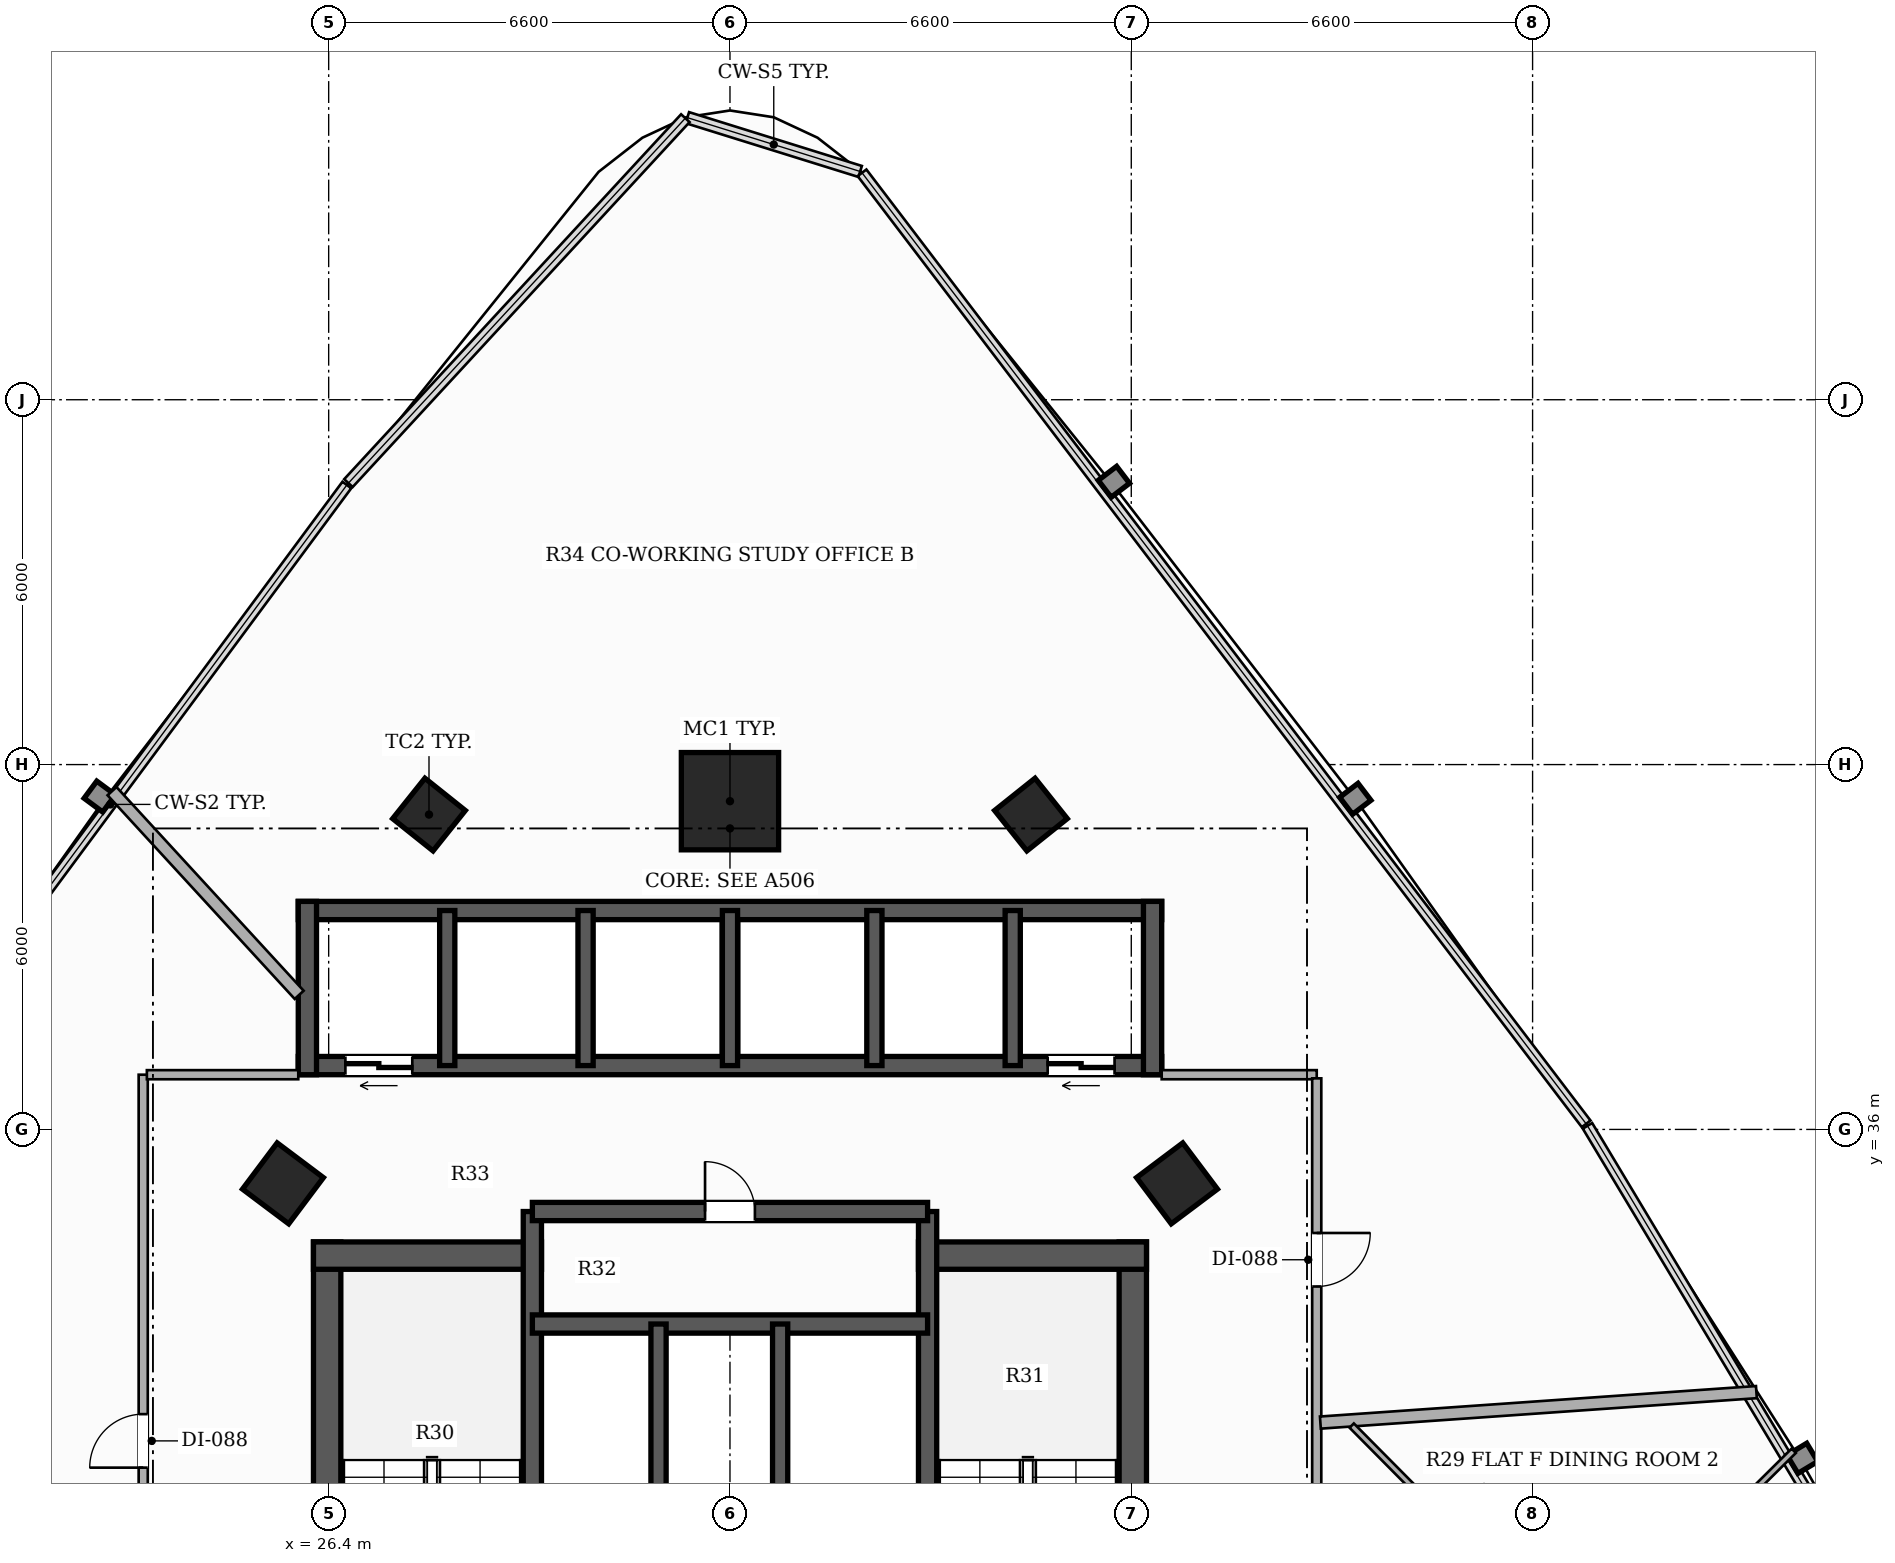
"""IFC4 building model, lengths in metres.
Left out: names, types, materials, properties, quantities, classifications, styles, units other than length and angle.
Written with IfcOpenShell. Run it as: python <this file> out.ifc"""

import sys

from ifc_helpers import new_model, si_unit, direction, frame, frame_2d, origin, origin_2d, place, context, subcontext, project, spatial, rectangle, hollow_rectangle, extrude, element, fill, save


model = new_model("IFC4")
c1 = context("Model", 3, precision=1e-05, world=origin(), true_north=direction((0.0, 1.0)))
c2 = subcontext(c1, "Body", "Model", "MODEL_VIEW")
j1 = project(units=[si_unit("LENGTHUNIT", "METRE"), si_unit("PLANEANGLEUNIT", "RADIAN")], contexts=[c1])
p1 = place(None, origin())
s1 = spatial("IfcSite", under=j1, at=p1, CompositionType="ELEMENT")
p2 = place(p1, origin())
s2 = spatial("IfcBuilding", under=s1, at=p2, CompositionType="ELEMENT")
p3 = place(p2, frame((0.0, 0.0, 26.9)))
s3 = spatial("IfcBuildingStorey", under=s2, at=p3, CompositionType="ELEMENT", Elevation=26.9)
p4 = place(p3, frame((26.375, 26.45, 0.0), z_axis=(0.0, 0.0, 1.0), x_axis=(0.0, 1.0, 0.0)))
e1 = element("IfcWall", 1, at=p4, inside=s3, PredefinedType="SHEAR", context=c2, shape_type="SweptSolid", body=[
    extrude(rectangle(XDim=7.7, YDim=0.45, at=frame_2d((3.85, 0.0))), origin(), (0.0, 0.0, 1.0), 3.3),
])
p5 = place(p3, frame((26.15, 33.925, 0.0), z_axis=(0.0, 0.0, 1.0), x_axis=(1.0, 0.0, 0.0)))
e2 = element("IfcWall", 2, at=p5, inside=s3, PredefinedType="SHEAR", context=c2, shape_type="SweptSolid", body=[
    extrude(rectangle(XDim=3.75, YDim=0.45, at=frame_2d((1.875, 0.0))), origin(), (0.0, 0.0, 1.0), 3.3),
])
p6 = place(p3, frame((39.625, 26.45, 0.0), z_axis=(0.0, 0.0, 1.0), x_axis=(0.0, 1.0, 0.0)))
e3 = element("IfcWall", 3, at=p6, inside=s3, PredefinedType="SHEAR", context=c2, shape_type="SweptSolid", body=[
    extrude(rectangle(XDim=7.7, YDim=0.45, at=frame_2d((3.85, 0.0))), origin(), (0.0, 0.0, 1.0), 3.3),
])
p7 = place(p3, frame((36.1, 33.925, 0.0), z_axis=(0.0, 0.0, 1.0), x_axis=(1.0, 0.0, 0.0)))
e4 = element("IfcWall", 4, at=p7, inside=s3, PredefinedType="SHEAR", context=c2, shape_type="SweptSolid", body=[
    extrude(rectangle(XDim=3.75, YDim=0.45, at=frame_2d((1.875, 0.0))), origin(), (0.0, 0.0, 1.0), 3.3),
])
p8 = place(p3, frame((29.75, 26.45, 0.0), z_axis=(0.0, 0.0, 1.0), x_axis=(0.0, 1.0, 0.0)))
e5 = element("IfcWall", 5, at=p8, inside=s3, PredefinedType="SHEAR", context=c2, shape_type="SweptSolid", body=[
    extrude(rectangle(XDim=8.2, YDim=0.3, at=frame_2d((4.1, 0.0))), origin(), (0.0, 0.0, 1.0), 3.3),
])
p9 = place(p8, frame((0.6, 0.0, 0.0)))
e6 = element("IfcOpeningElement", 6, at=p9, cuts=e5, PredefinedType="OPENING", context=c2, shape_type="SweptSolid", body=[
    extrude(rectangle(XDim=1.05, YDim=2.15, at=frame_2d((0.525, 1.075))), frame((0.0, 0.16, 0.0), z_axis=(0.0, -1.0, 0.0), x_axis=(1.0, 0.0, 0.0)), (0.0, 0.0, 1.0), 0.32),
])
p10 = place(p3, frame((36.25, 26.45, 0.0), z_axis=(0.0, 0.0, 1.0), x_axis=(0.0, 1.0, 0.0)))
e7 = element("IfcWall", 7, at=p10, inside=s3, PredefinedType="SHEAR", context=c2, shape_type="SweptSolid", body=[
    extrude(rectangle(XDim=8.2, YDim=0.3, at=frame_2d((4.1, 0.0))), origin(), (0.0, 0.0, 1.0), 3.3),
])
p11 = place(p10, frame((0.6, 0.0, 0.0)))
e8 = element("IfcOpeningElement", 8, at=p11, cuts=e7, PredefinedType="OPENING", context=c2, shape_type="SweptSolid", body=[
    extrude(rectangle(XDim=1.05, YDim=2.15, at=frame_2d((0.525, 1.075))), frame((0.0, 0.16, 0.0), z_axis=(0.0, -1.0, 0.0), x_axis=(1.0, 0.0, 0.0)), (0.0, 0.0, 1.0), 0.32),
])
p12 = place(p3, frame((29.75, 32.8, 0.0), z_axis=(0.0, 0.0, 1.0), x_axis=(1.0, 0.0, 0.0)))
e9 = element("IfcWall", 9, at=p12, inside=s3, PredefinedType="SHEAR", context=c2, shape_type="SweptSolid", body=[
    extrude(rectangle(XDim=6.5, YDim=0.3, at=frame_2d((3.25, 0.0))), origin(), (0.0, 0.0, 1.0), 3.3),
])
for number, where, z_axis, x_axis in (
    (10, (31.825, 29.9, 0.0), (0.0, 0.0, 1.0), (0.0, 1.0, 0.0)),
    (11, (33.825, 29.9, 0.0), (0.0, 0.0, 1.0), (0.0, 1.0, 0.0)),
):
    element("IfcWall", number, at=place(p3, frame(where, z_axis=z_axis, x_axis=x_axis)), inside=s3, PredefinedType="SHEAR", context=c2, shape_type="SweptSolid", body=[
        extrude(rectangle(XDim=2.9, YDim=0.25, at=frame_2d((1.45, 0.0))), origin(), (0.0, 0.0, 1.0), 3.3),
    ])
p13 = place(p3, frame((29.75, 34.65, 0.0), z_axis=(0.0, 0.0, 1.0), x_axis=(1.0, 0.0, 0.0)))
e12 = element("IfcWall", 12, at=p13, inside=s3, PredefinedType="SHEAR", context=c2, shape_type="SweptSolid", body=[
    extrude(rectangle(XDim=6.5, YDim=0.3, at=frame_2d((3.25, 0.0))), origin(), (0.0, 0.0, 1.0), 3.3),
])
p14 = place(p13, frame((2.84, 0.0, 0.0)))
e13 = element("IfcOpeningElement", 13, at=p14, cuts=e12, PredefinedType="OPENING", context=c2, shape_type="SweptSolid", body=[
    extrude(rectangle(XDim=0.82, YDim=2.1, at=frame_2d((0.41, 1.05))), frame((0.0, 0.16, 0.0), z_axis=(0.0, -1.0, 0.0), x_axis=(1.0, 0.0, 0.0)), (0.0, 0.0, 1.0), 0.32),
])
p15 = place(p3, frame((40.1, 37.05, 0.0), z_axis=(0.0, 0.0, 1.0), x_axis=(-1.0, 0.0, 0.0)))
e14 = element("IfcWall", 14, at=p15, inside=s3, PredefinedType="SHEAR", context=c2, shape_type="SweptSolid", body=[
    extrude(rectangle(XDim=14.2, YDim=0.3, at=frame_2d((7.1, 0.0))), origin(), (0.0, 0.0, 1.0), 3.3),
])
p16 = place(p15, frame((12.325, 0.0, 0.0)))
e15 = element("IfcOpeningElement", 15, at=p16, cuts=e14, PredefinedType="OPENING", context=c2, shape_type="SweptSolid", body=[
    extrude(rectangle(XDim=1.1, YDim=2.2, at=frame_2d((0.55, 1.1))), frame((0.0, 0.16, 0.0), z_axis=(0.0, -1.0, 0.0), x_axis=(1.0, 0.0, 0.0)), (0.0, 0.0, 1.0), 0.32),
])
p17 = place(p15, frame((0.775, 0.0, 0.0)))
e16 = element("IfcOpeningElement", 16, at=p17, cuts=e14, PredefinedType="OPENING", context=c2, shape_type="SweptSolid", body=[
    extrude(rectangle(XDim=1.1, YDim=2.2, at=frame_2d((0.55, 1.1))), frame((0.0, 0.16, 0.0), z_axis=(0.0, -1.0, 0.0), x_axis=(1.0, 0.0, 0.0)), (0.0, 0.0, 1.0), 0.32),
])
p18 = place(p3, frame((25.9, 39.6, 0.0), z_axis=(0.0, 0.0, 1.0), x_axis=(1.0, 0.0, 0.0)))
e17 = element("IfcWall", 17, at=p18, inside=s3, PredefinedType="SHEAR", context=c2, shape_type="SweptSolid", body=[
    extrude(rectangle(XDim=14.2, YDim=0.3, at=frame_2d((7.1, 0.0))), origin(), (0.0, 0.0, 1.0), 3.3),
])
for number, where, z_axis, x_axis in (
    (18, (26.05, 36.9, 0.0), (0.0, 0.0, 1.0), (0.0, 1.0, 0.0)),
    (19, (39.95, 36.9, 0.0), (0.0, 0.0, 1.0), (0.0, 1.0, 0.0)),
):
    element("IfcWall", number, at=place(p3, frame(where, z_axis=z_axis, x_axis=x_axis)), inside=s3, PredefinedType="SHEAR", context=c2, shape_type="SweptSolid", body=[
        extrude(rectangle(XDim=2.85, YDim=0.3, at=frame_2d((1.425, 0.0))), origin(), (0.0, 0.0, 1.0), 3.3),
    ])
for number, where, z_axis, x_axis in (
    (20, (28.35, 37.05, 0.0), (0.0, 0.0, 1.0), (0.0, 1.0, 0.0)),
    (21, (30.625, 37.05, 0.0), (0.0, 0.0, 1.0), (0.0, 1.0, 0.0)),
    (22, (33.0, 37.05, 0.0), (0.0, 0.0, 1.0), (0.0, 1.0, 0.0)),
    (23, (35.375, 37.05, 0.0), (0.0, 0.0, 1.0), (0.0, 1.0, 0.0)),
    (24, (37.65, 37.05, 0.0), (0.0, 0.0, 1.0), (0.0, 1.0, 0.0)),
):
    element("IfcWall", number, at=place(p3, frame(where, z_axis=z_axis, x_axis=x_axis)), inside=s3, PredefinedType="SHEAR", context=c2, shape_type="SweptSolid", body=[
        extrude(rectangle(XDim=2.55, YDim=0.25, at=frame_2d((1.275, 0.0))), origin(), (0.0, 0.0, 1.0), 3.3),
    ])
p19 = place(p3, frame((33.0, 41.398, 0.0), z_axis=(0.0, 0.0, 1.0), x_axis=(1.0, 0.0, 0.0)))
e25 = element("IfcColumn", 25, at=p19, inside=s3, PredefinedType="COLUMN", context=c2, shape_type="SweptSolid", body=[
    extrude(hollow_rectangle(XDim=1.6, YDim=1.6, WallThickness=0.05, at=origin_2d()), origin(), (0.0, 0.0, 1.0), 3.3),
])
for number, where, z_axis, x_axis in (
    (26, (25.648, 35.113, 0.0), (0.0, 0.0, 1.0), (0.6, 0.8, 0.0)),
    (27, (40.352, 35.113, 0.0), (0.0, 0.0, 1.0), (-0.6, 0.8, 0.0)),
):
    element("IfcColumn", number, at=place(p3, frame(where, z_axis=z_axis, x_axis=x_axis)), inside=s3, PredefinedType="COLUMN", context=c2, shape_type="SweptSolid", body=[
        extrude(hollow_rectangle(XDim=0.95, YDim=0.95, WallThickness=0.032, at=origin_2d()), origin(), (0.0, 0.0, 1.0), 3.3),
    ])
for number, where, z_axis, x_axis in (
    (28, (28.05, 41.178, 0.0), (0.0, 0.0, 1.0), (0.624, 0.782, 0.0)),
    (29, (37.95, 41.178, 0.0), (0.0, 0.0, 1.0), (-0.624, 0.782, 0.0)),
):
    element("IfcColumn", number, at=place(p3, frame(where, z_axis=z_axis, x_axis=x_axis)), inside=s3, PredefinedType="COLUMN", context=c2, shape_type="SweptSolid", body=[
        extrude(hollow_rectangle(XDim=0.85, YDim=0.85, WallThickness=0.028, at=origin_2d()), origin(), (0.0, 0.0, 1.0), 3.3),
    ])
p20 = place(p3, frame((40.1, 36.9, 0.0), z_axis=(0.0, 0.0, 1.0), x_axis=(1.0, 0.0, 0.0)))
e30 = element("IfcWall", 30, at=p20, inside=s3, PredefinedType="PARTITIONING", context=c2, shape_type="SweptSolid", body=[
    extrude(rectangle(XDim=2.55, YDim=0.15, at=frame_2d((1.275, 0.0))), origin(), (0.0, 0.0, 1.0), 2.413),
])
p21 = place(p3, frame((42.65, 36.84, 0.0), z_axis=(0.0, 0.0, 1.0), x_axis=(0.0, -1.0, 0.0)))
e31 = element("IfcWall", 31, at=p21, inside=s3, PredefinedType="PARTITIONING", context=c2, shape_type="SweptSolid", body=[
    extrude(rectangle(XDim=25.04, YDim=0.15, at=frame_2d((12.52, 0.0))), origin(), (0.0, 0.0, 1.0), 2.413),
])
p22 = place(p21, frame((2.543, 0.0, 0.0)))
e32 = element("IfcOpeningElement", 32, at=p22, cuts=e31, PredefinedType="OPENING", context=c2, shape_type="SweptSolid", body=[
    extrude(rectangle(XDim=0.88, YDim=2.1, at=frame_2d((0.44, 1.05))), frame((0.0, 0.085, 0.0), z_axis=(0.0, -1.0, 0.0), x_axis=(1.0, 0.0, 0.0)), (0.0, 0.0, 1.0), 0.17),
])
p23 = place(p21, frame((15.79, 0.0, 0.0)))
e33 = element("IfcOpeningElement", 33, at=p23, cuts=e31, PredefinedType="OPENING", context=c2, shape_type="SweptSolid", body=[
    extrude(rectangle(XDim=0.92, YDim=2.15, at=frame_2d((0.46, 1.075))), frame((0.0, 0.085, 0.0), z_axis=(0.0, -1.0, 0.0), x_axis=(1.0, 0.0, 0.0)), (0.0, 0.0, 1.0), 0.17),
])
p24 = place(p21, frame((9.103, 0.0, 0.0)))
e34 = element("IfcOpeningElement", 34, at=p24, cuts=e31, PredefinedType="OPENING", context=c2, shape_type="SweptSolid", body=[
    extrude(rectangle(XDim=0.92, YDim=2.15, at=frame_2d((0.46, 1.075))), frame((0.0, 0.085, 0.0), z_axis=(0.0, -1.0, 0.0), x_axis=(1.0, 0.0, 0.0)), (0.0, 0.0, 1.0), 0.17),
])
p25 = place(p3, frame((23.35, 11.86, 0.0), z_axis=(0.0, 0.0, 1.0), x_axis=(0.0, 1.0, 0.0)))
e35 = element("IfcWall", 35, at=p25, inside=s3, PredefinedType="PARTITIONING", context=c2, shape_type="SweptSolid", body=[
    extrude(rectangle(XDim=25.04, YDim=0.15, at=frame_2d((12.52, 0.0))), origin(), (0.0, 0.0, 1.0), 2.413),
])
p26 = place(p25, frame((9.872, 0.0, 0.0)))
e36 = element("IfcOpeningElement", 36, at=p26, cuts=e35, PredefinedType="OPENING", context=c2, shape_type="SweptSolid", body=[
    extrude(rectangle(XDim=0.92, YDim=2.15, at=frame_2d((0.46, 1.075))), frame((0.0, 0.085, 0.0), z_axis=(0.0, -1.0, 0.0), x_axis=(1.0, 0.0, 0.0)), (0.0, 0.0, 1.0), 0.17),
])
p27 = place(p25, frame((18.578, 0.0, 0.0)))
e37 = element("IfcOpeningElement", 37, at=p27, cuts=e35, PredefinedType="OPENING", context=c2, shape_type="SweptSolid", body=[
    extrude(rectangle(XDim=0.88, YDim=2.1, at=frame_2d((0.44, 1.05))), frame((0.0, 0.085, 0.0), z_axis=(0.0, -1.0, 0.0), x_axis=(1.0, 0.0, 0.0)), (0.0, 0.0, 1.0), 0.17),
])
p28 = place(p3, frame((23.41, 36.9, 0.0), z_axis=(0.0, 0.0, 1.0), x_axis=(1.0, 0.0, 0.0)))
e38 = element("IfcWall", 38, at=p28, inside=s3, PredefinedType="PARTITIONING", context=c2, shape_type="SweptSolid", body=[
    extrude(rectangle(XDim=2.49, YDim=0.15, at=frame_2d((1.245, 0.0))), origin(), (0.0, 0.0, 1.0), 2.413),
])
p29 = place(p3, frame((49.881, 31.68, 0.0), z_axis=(0.0, 0.0, 1.0), x_axis=(-0.997568680722, -0.069690223431, 0.0)))
e39 = element("IfcWall", 39, at=p29, inside=s3, PredefinedType="PARTITIONING", context=c2, shape_type="SweptSolid", body=[
    extrude(rectangle(XDim=7.189, YDim=0.2, at=frame_2d((3.594, 0.0))), origin(), (0.0, 0.0, 1.0), 2.413),
])
p30 = place(p3, frame((25.915, 38.213, 0.0), z_axis=(0.0, 0.0, 1.0), x_axis=(-0.676584398078, 0.736365094418, 0.0)))
e40 = element("IfcWall", 40, at=p30, inside=s3, PredefinedType="PARTITIONING", context=c2, shape_type="SweptSolid", body=[
    extrude(rectangle(XDim=4.55, YDim=0.2, at=frame_2d((2.275, 0.0))), origin(), (0.0, 0.0, 1.0), 2.619),
])
p31 = place(p3, frame((43.225, 31.13, 0.0), z_axis=(0.0, 0.0, 1.0), x_axis=(0.703942028385, -0.710257432677, 0.0)))
e41 = element("IfcWall", 41, at=p31, inside=s3, PredefinedType="PARTITIONING", context=c2, shape_type="SweptSolid", body=[
    extrude(rectangle(XDim=5.412, YDim=0.1, at=frame_2d((2.706, 0.0))), origin(), (0.0, 0.0, 1.0), 2.413),
])
p32 = place(p31, frame((2.216, 0.0, 0.0)))
e42 = element("IfcOpeningElement", 42, at=p32, cuts=e41, PredefinedType="OPENING", context=c2, shape_type="SweptSolid", body=[
    extrude(rectangle(XDim=0.88, YDim=2.1, at=frame_2d((0.44, 1.05))), frame((0.0, 0.06, 0.0), z_axis=(0.0, -1.0, 0.0), x_axis=(1.0, 0.0, 0.0)), (0.0, 0.0, 1.0), 0.12),
])
p33 = place(p3, frame((47.035, 27.286, 0.0), z_axis=(0.0, 0.0, 1.0), x_axis=(0.71028193183, 0.703917308578, 0.0)))
e43 = element("IfcWall", 43, at=p33, inside=s3, PredefinedType="PARTITIONING", context=c2, shape_type="SweptSolid", body=[
    extrude(rectangle(XDim=4.872, YDim=0.1, at=frame_2d((2.436, 0.0))), origin(), (0.0, 0.0, 1.0), 3.06),
])
p34 = place(p16, origin())
e44 = element("IfcDoor", 44, at=p34, inside=s3, OperationType="DOUBLE_DOOR_SLIDING", PredefinedType="DOOR", context=c2, shape_type="SweptSolid", body=[
    extrude(rectangle(XDim=1.1, YDim=2.2, at=frame_2d((0.55, 1.1))), frame((0.0, 0.025, 0.0), z_axis=(0.0, -1.0, 0.0), x_axis=(1.0, 0.0, 0.0)), (0.0, 0.0, 1.0), 0.05),
])
fill(e15, e44)
p35 = place(p17, origin())
e45 = element("IfcDoor", 45, at=p35, inside=s3, OperationType="DOUBLE_DOOR_SLIDING", PredefinedType="DOOR", context=c2, shape_type="SweptSolid", body=[
    extrude(rectangle(XDim=1.1, YDim=2.2, at=frame_2d((0.55, 1.1))), frame((0.0, 0.025, 0.0), z_axis=(0.0, -1.0, 0.0), x_axis=(1.0, 0.0, 0.0)), (0.0, 0.0, 1.0), 0.05),
])
fill(e16, e45)
p36 = place(p14, origin())
e46 = element("IfcDoor", 46, at=p36, inside=s3, OperationType="SINGLE_SWING_LEFT", PredefinedType="DOOR", context=c2, shape_type="SweptSolid", body=[
    extrude(rectangle(XDim=0.82, YDim=2.1, at=frame_2d((0.41, 1.05))), frame((0.0, 0.025, 0.0), z_axis=(0.0, -1.0, 0.0), x_axis=(1.0, 0.0, 0.0)), (0.0, 0.0, 1.0), 0.05),
])
fill(e13, e46)
p37 = place(p22, origin())
e47 = element("IfcDoor", 47, at=p37, inside=s3, OperationType="SINGLE_SWING_LEFT", PredefinedType="DOOR", context=c2, shape_type="SweptSolid", body=[
    extrude(rectangle(XDim=0.88, YDim=2.1, at=frame_2d((0.44, 1.05))), frame((0.0, 0.025, 0.0), z_axis=(0.0, -1.0, 0.0), x_axis=(1.0, 0.0, 0.0)), (0.0, 0.0, 1.0), 0.05),
])
fill(e32, e47)
p38 = place(p27, origin())
e48 = element("IfcDoor", 48, at=p38, inside=s3, OperationType="SINGLE_SWING_LEFT", PredefinedType="DOOR", context=c2, shape_type="SweptSolid", body=[
    extrude(rectangle(XDim=0.88, YDim=2.1, at=frame_2d((0.44, 1.05))), frame((0.0, 0.025, 0.0), z_axis=(0.0, -1.0, 0.0), x_axis=(1.0, 0.0, 0.0)), (0.0, 0.0, 1.0), 0.05),
])
fill(e37, e48)
save(model, sys.argv[1])
